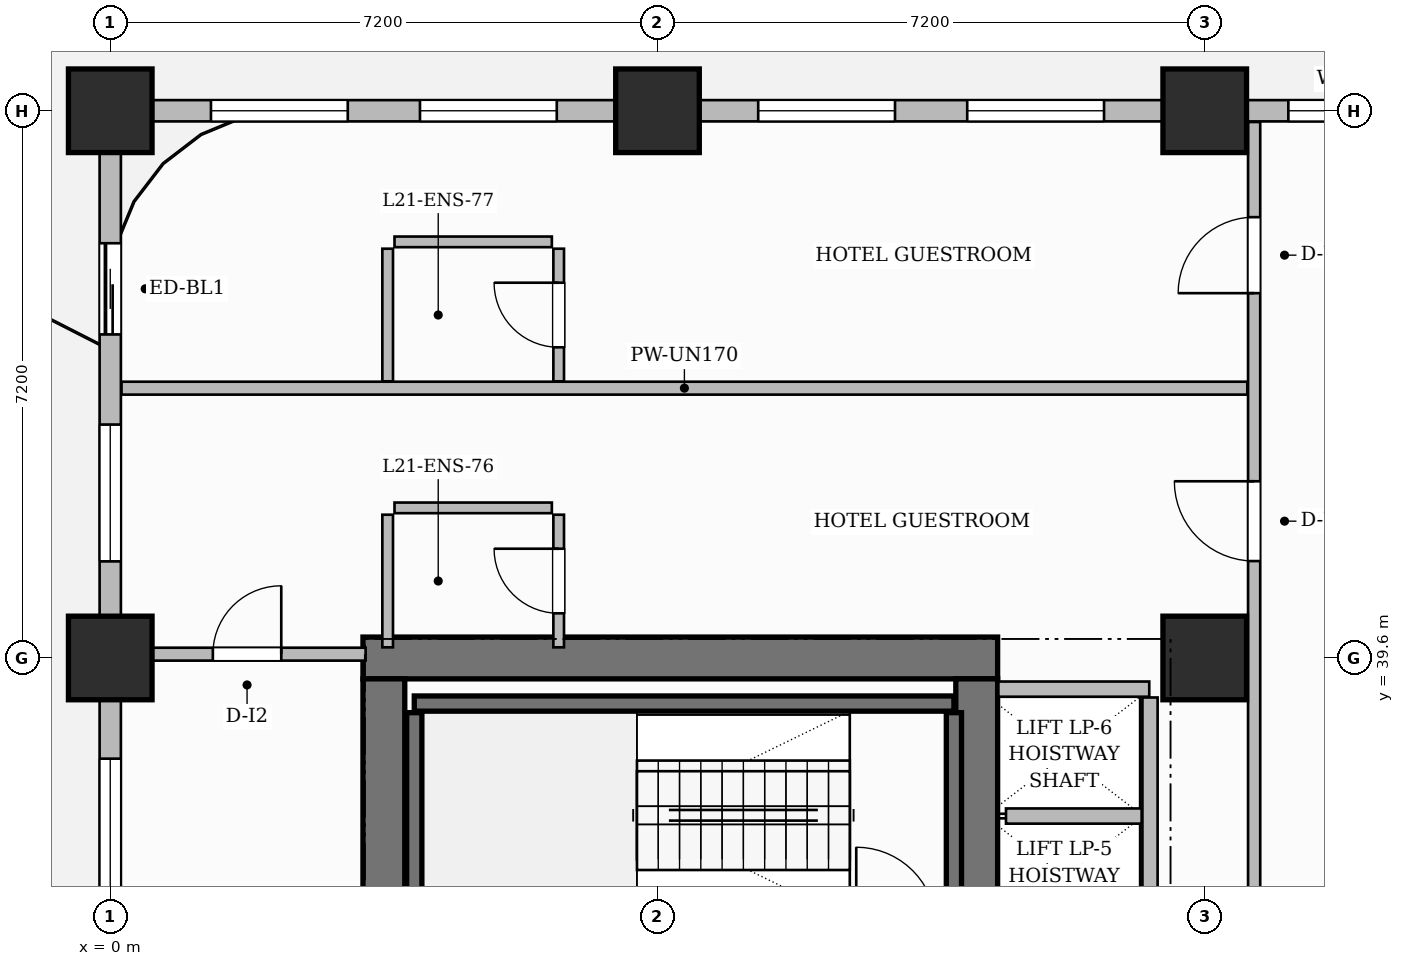
"""IFC4 building model, lengths in metres.
Left out: names, types, materials, properties, quantities, classifications, styles, units other than length and angle.
Written with IfcOpenShell. Run it as: python <this file> out.ifc"""

import sys

from ifc_helpers import new_model, si_unit, direction, frame, frame_2d, origin, origin_2d, place, context, subcontext, project, spatial, rectangle, extrude, source, transform, mapped, element, fill, save


model = new_model("IFC4")
c1 = context("Model", 3, precision=1e-05, world=origin(), true_north=direction((0.0, 1.0)))
c2 = subcontext(c1, "Body", "Model", "MODEL_VIEW")
j1 = project(units=[si_unit("LENGTHUNIT", "METRE"), si_unit("PLANEANGLEUNIT", "RADIAN")], contexts=[c1])
p1 = place(None, origin())
s1 = spatial("IfcSite", under=j1, at=p1, CompositionType="ELEMENT")
p2 = place(p1, origin())
s2 = spatial("IfcBuilding", under=s1, at=p2, CompositionType="ELEMENT")
p3 = place(p2, frame((0.0, 0.0, 87.9)))
s3 = spatial("IfcBuildingStorey", under=s2, at=p3, CompositionType="ELEMENT", Elevation=87.9)
p4 = place(p3, frame((3.325, 39.6, 0.0), z_axis=(0.0, 0.0, 1.0), x_axis=(1.0, 0.0, 0.0)))
e1 = element("IfcWall", 1, at=p4, inside=s3, PredefinedType="SHEAR", context=c2, shape_type="SweptSolid", body=[
    extrude(rectangle(XDim=8.35, YDim=0.55, at=frame_2d((4.175, 0.0))), origin(), (0.0, 0.0, 1.0), 3.7),
])
p5 = place(p3, frame((3.6, 25.475, 0.0), z_axis=(0.0, 0.0, 1.0), x_axis=(0.0, 1.0, 0.0)))
e2 = element("IfcWall", 2, at=p5, inside=s3, PredefinedType="SHEAR", context=c2, shape_type="SweptSolid", body=[
    extrude(rectangle(XDim=13.85, YDim=0.55, at=frame_2d((6.925, 0.0))), origin(), (0.0, 0.0, 1.0), 3.7),
])
p6 = place(p3, frame((11.4, 25.475, 0.0), z_axis=(0.0, 0.0, 1.0), x_axis=(0.0, 1.0, 0.0)))
e3 = element("IfcWall", 3, at=p6, inside=s3, PredefinedType="SHEAR", context=c2, shape_type="SweptSolid", body=[
    extrude(rectangle(XDim=13.85, YDim=0.55, at=frame_2d((6.925, 0.0))), origin(), (0.0, 0.0, 1.0), 3.7),
])
p7 = place(p6, frame((6.495, 0.0, 0.0)))
e4 = element("IfcOpeningElement", 4, at=p7, cuts=e3, PredefinedType="OPENING", context=c2, shape_type="SweptSolid", body=[
    extrude(rectangle(XDim=1.5, YDim=2.2, at=frame_2d((0.75, 1.1))), frame((0.0, 0.285, 0.0), z_axis=(0.0, -1.0, 0.0), x_axis=(1.0, 0.0, 0.0)), (0.0, 0.0, 1.0), 0.57),
])
m1 = source(origin(), c2, "Body", "SweptSolid", [
    extrude(rectangle(XDim=1.1, YDim=1.1, at=origin_2d()), origin(), (0.0, 0.0, 1.0), 3.7),
])
for number, where, z_axis, x_axis in (
    (5, (0.0, 39.6, 0.0), (0.0, 0.0, 1.0), (1.0, 0.0, 0.0)),
    (6, (0.0, 46.8, 0.0), (0.0, 0.0, 1.0), (1.0, 0.0, 0.0)),
    (7, (7.2, 46.8, 0.0), (0.0, 0.0, 1.0), (1.0, 0.0, 0.0)),
    (8, (14.4, 39.6, 0.0), (0.0, 0.0, 1.0), (1.0, 0.0, 0.0)),
    (9, (14.4, 46.8, 0.0), (0.0, 0.0, 1.0), (1.0, 0.0, 0.0)),
):
    element("IfcColumn", number, at=place(p3, frame(where, z_axis=z_axis, x_axis=x_axis)), inside=s3, PredefinedType="COLUMN", context=c2, shape_type="MappedRepresentation", body=[
        mapped(m1, transform((0.0, 0.0, 0.0), scale=1.0)),
    ])
p8 = place(p3, frame((4.0, 39.0, 0.0), z_axis=(0.0, 0.0, 1.0), x_axis=(1.0, 0.0, 0.0)))
e10 = element("IfcWall", 10, at=p8, inside=s3, PredefinedType="SHEAR", context=c2, shape_type="SweptSolid", body=[
    extrude(rectangle(XDim=7.1, YDim=0.2, at=frame_2d((3.55, 0.0))), origin(), (0.0, 0.0, 1.0), 3.7),
])
for number, where, z_axis, x_axis in (
    (11, (4.0, 36.18, 0.0), (0.0, 0.0, 1.0), (0.0, 1.0, 0.0)),
    (12, (11.1, 36.18, 0.0), (0.0, 0.0, 1.0), (0.0, 1.0, 0.0)),
):
    element("IfcWall", number, at=place(p3, frame(where, z_axis=z_axis, x_axis=x_axis)), inside=s3, PredefinedType="SHEAR", context=c2, shape_type="SweptSolid", body=[
        extrude(rectangle(XDim=2.7, YDim=0.2, at=frame_2d((1.35, 0.0))), origin(), (0.0, 0.0, 1.0), 3.7),
    ])
p9 = place(p3, frame((11.685, 39.19, 0.0), z_axis=(0.0, 0.0, 1.0), x_axis=(1.0, 0.0, 0.0)))
e13 = element("IfcWall", 13, at=p9, inside=s3, PredefinedType="PARTITIONING", context=c2, shape_type="SweptSolid", body=[
    extrude(rectangle(XDim=1.985, YDim=0.2, at=frame_2d((0.992, 0.0))), origin(), (0.0, 0.0, 1.0), 3.45),
])
p10 = place(p3, frame((13.68, 34.36, 0.0), z_axis=(0.0, 0.0, 1.0), x_axis=(0.0, 1.0, 0.0)))
e14 = element("IfcWall", 14, at=p10, inside=s3, PredefinedType="PARTITIONING", context=c2, shape_type="SweptSolid", body=[
    extrude(rectangle(XDim=4.72, YDim=0.2, at=frame_2d((2.36, 0.0))), origin(), (0.0, 0.0, 1.0), 3.45),
])
p11 = place(p3, frame((11.785, 37.52, 0.0), z_axis=(0.0, 0.0, 1.0), x_axis=(1.0, 0.0, 0.0)))
e15 = element("IfcWall", 15, at=p11, inside=s3, PredefinedType="PARTITIONING", context=c2, shape_type="SweptSolid", body=[
    extrude(rectangle(XDim=1.785, YDim=0.2, at=frame_2d((0.893, 0.0))), origin(), (0.0, 0.0, 1.0), 3.45),
])
p12 = place(p3, frame((0.24, 39.65, 0.0), z_axis=(0.0, 0.0, 1.0), x_axis=(1.0, 0.0, 0.0)))
e16 = element("IfcWall", 16, at=p12, inside=s3, PredefinedType="PARTITIONING", context=c2, shape_type="SweptSolid", body=[
    extrude(rectangle(XDim=3.12, YDim=0.17, at=frame_2d((1.56, 0.0))), origin(), (0.0, 0.0, 1.0), 3.45),
])
p13 = place(p12, frame((1.11, 0.0, 0.0)))
e17 = element("IfcOpeningElement", 17, at=p13, cuts=e16, PredefinedType="OPENING", context=c2, shape_type="SweptSolid", body=[
    extrude(rectangle(XDim=0.9, YDim=2.15, at=frame_2d((0.45, 1.075))), frame((0.0, 0.095, 0.0), z_axis=(0.0, -1.0, 0.0), x_axis=(1.0, 0.0, 0.0)), (0.0, 0.0, 1.0), 0.19),
])
p14 = place(p3, frame((15.05, 34.34, 0.0), z_axis=(0.0, 0.0, 1.0), x_axis=(0.0, 1.0, 0.0)))
e18 = element("IfcWall", 18, at=p14, inside=s3, PredefinedType="PARTITIONING", context=c2, shape_type="SweptSolid", body=[
    extrude(rectangle(XDim=12.312, YDim=0.16, at=frame_2d((6.156, 0.0))), origin(), (0.0, 0.0, 1.0), 3.45),
])
p15 = place(p14, frame((6.535, 0.0, 0.0)))
e19 = element("IfcOpeningElement", 19, at=p15, cuts=e18, PredefinedType="OPENING", context=c2, shape_type="SweptSolid", body=[
    extrude(rectangle(XDim=1.05, YDim=2.25, at=frame_2d((0.525, 1.125))), frame((0.0, 0.09, 0.0), z_axis=(0.0, -1.0, 0.0), x_axis=(1.0, 0.0, 0.0)), (0.0, 0.0, 1.0), 0.18),
])
p16 = place(p14, frame((10.06, 0.0, 0.0)))
e20 = element("IfcOpeningElement", 20, at=p16, cuts=e18, PredefinedType="OPENING", context=c2, shape_type="SweptSolid", body=[
    extrude(rectangle(XDim=1.0, YDim=2.2, at=frame_2d((0.5, 1.1))), frame((0.0, 0.09, 0.0), z_axis=(0.0, -1.0, 0.0), x_axis=(1.0, 0.0, 0.0)), (0.0, 0.0, 1.0), 0.18),
])
p17 = place(p3, frame((0.148, 43.15, 0.0), z_axis=(0.0, 0.0, 1.0), x_axis=(1.0, 0.0, 0.0)))
e21 = element("IfcWall", 21, at=p17, inside=s3, PredefinedType="PARTITIONING", context=c2, shape_type="SweptSolid", body=[
    extrude(rectangle(XDim=14.812, YDim=0.17, at=frame_2d((7.406, 0.0))), origin(), (0.0, 0.0, 1.0), 3.45),
])
p18 = place(p3, frame((3.65, 39.74, 0.0), z_axis=(0.0, 0.0, 1.0), x_axis=(0.0, 1.0, 0.0)))
e22 = element("IfcWall", 22, at=p18, inside=s3, PredefinedType="PARTITIONING", context=c2, shape_type="SweptSolid", body=[
    extrude(rectangle(XDim=1.745, YDim=0.14, at=frame_2d((0.873, 0.0))), origin(), (0.0, 0.0, 1.0), 3.45),
])
p19 = place(p3, frame((3.74, 41.575, 0.0), z_axis=(0.0, 0.0, 1.0), x_axis=(1.0, 0.0, 0.0)))
e23 = element("IfcWall", 23, at=p19, inside=s3, PredefinedType="PARTITIONING", context=c2, shape_type="SweptSolid", body=[
    extrude(rectangle(XDim=2.07, YDim=0.14, at=frame_2d((1.035, 0.0))), origin(), (0.0, 0.0, 1.0), 2.885),
])
p20 = place(p3, frame((5.9, 39.74, 0.0), z_axis=(0.0, 0.0, 1.0), x_axis=(0.0, 1.0, 0.0)))
e24 = element("IfcWall", 24, at=p20, inside=s3, PredefinedType="PARTITIONING", context=c2, shape_type="SweptSolid", body=[
    extrude(rectangle(XDim=1.745, YDim=0.14, at=frame_2d((0.873, 0.0))), origin(), (0.0, 0.0, 1.0), 3.45),
])
p21 = place(p20, frame((0.448, 0.0, 0.0)))
e25 = element("IfcOpeningElement", 25, at=p21, cuts=e24, PredefinedType="OPENING", context=c2, shape_type="SweptSolid", body=[
    extrude(rectangle(XDim=0.85, YDim=2.1, at=frame_2d((0.425, 1.05))), frame((0.0, 0.08, 0.0), z_axis=(0.0, -1.0, 0.0), x_axis=(1.0, 0.0, 0.0)), (0.0, 0.0, 1.0), 0.16),
])
p22 = place(p3, frame((3.65, 43.24, 0.0), z_axis=(0.0, 0.0, 1.0), x_axis=(0.0, 1.0, 0.0)))
e26 = element("IfcWall", 26, at=p22, inside=s3, PredefinedType="PARTITIONING", context=c2, shape_type="SweptSolid", body=[
    extrude(rectangle(XDim=1.745, YDim=0.14, at=frame_2d((0.873, 0.0))), origin(), (0.0, 0.0, 1.0), 3.45),
])
p23 = place(p3, frame((3.74, 45.075, 0.0), z_axis=(0.0, 0.0, 1.0), x_axis=(1.0, 0.0, 0.0)))
e27 = element("IfcWall", 27, at=p23, inside=s3, PredefinedType="PARTITIONING", context=c2, shape_type="SweptSolid", body=[
    extrude(rectangle(XDim=2.07, YDim=0.14, at=frame_2d((1.035, 0.0))), origin(), (0.0, 0.0, 1.0), 3.45),
])
p24 = place(p3, frame((5.9, 43.24, 0.0), z_axis=(0.0, 0.0, 1.0), x_axis=(0.0, 1.0, 0.0)))
e28 = element("IfcWall", 28, at=p24, inside=s3, PredefinedType="PARTITIONING", context=c2, shape_type="SweptSolid", body=[
    extrude(rectangle(XDim=1.745, YDim=0.14, at=frame_2d((0.873, 0.0))), origin(), (0.0, 0.0, 1.0), 3.45),
])
p25 = place(p24, frame((0.448, 0.0, 0.0)))
e29 = element("IfcOpeningElement", 29, at=p25, cuts=e28, PredefinedType="OPENING", context=c2, shape_type="SweptSolid", body=[
    extrude(rectangle(XDim=0.85, YDim=2.1, at=frame_2d((0.425, 1.05))), frame((0.0, 0.08, 0.0), z_axis=(0.0, -1.0, 0.0), x_axis=(1.0, 0.0, 0.0)), (0.0, 0.0, 1.0), 0.16),
])
p26 = place(p3, frame((0.0, 25.25, 0.0), z_axis=(0.0, 0.0, 1.0), x_axis=(0.0, 1.0, 0.0)))
e30 = element("IfcWall", 30, at=p26, inside=s3, PredefinedType="SOLIDWALL", context=c2, shape_type="SweptSolid", body=[
    extrude(rectangle(XDim=21.5, YDim=0.28, at=frame_2d((10.75, 0.0))), origin(), (0.0, 0.0, 1.0), 2.885),
])
p27 = place(p26, frame((18.607, 0.0, 0.0)))
e31 = element("IfcOpeningElement", 31, at=p27, cuts=e30, PredefinedType="OPENING", context=c2, shape_type="SweptSolid", body=[
    extrude(rectangle(XDim=1.2, YDim=2.2, at=frame_2d((0.6, 1.1))), frame((0.0, 0.15, 0.0), z_axis=(0.0, -1.0, 0.0), x_axis=(1.0, 0.0, 0.0)), (0.0, 0.0, 1.0), 0.3),
])
p28 = place(p26, frame((0.8, 0.0, 0.0)))
e32 = element("IfcOpeningElement", 32, at=p28, cuts=e30, PredefinedType="OPENING", context=c2, shape_type="SweptSolid", body=[
    extrude(rectangle(XDim=1.2, YDim=2.2, at=frame_2d((0.6, 1.1))), frame((0.0, 0.15, 0.0), z_axis=(0.0, -1.0, 0.0), x_axis=(1.0, 0.0, 0.0)), (0.0, 0.0, 1.0), 0.3),
])
p29 = place(p26, frame((3.425, 0.0, 0.8)))
e33 = element("IfcOpeningElement", 33, at=p29, cuts=e30, PredefinedType="OPENING", context=c2, shape_type="SweptSolid", body=[
    extrude(rectangle(XDim=1.8, YDim=1.85, at=frame_2d((0.9, 0.925))), frame((0.0, 0.15, 0.0), z_axis=(0.0, -1.0, 0.0), x_axis=(1.0, 0.0, 0.0)), (0.0, 0.0, 1.0), 0.3),
])
p30 = place(p26, frame((8.475, 0.0, 0.8)))
e34 = element("IfcOpeningElement", 34, at=p30, cuts=e30, PredefinedType="OPENING", context=c2, shape_type="SweptSolid", body=[
    extrude(rectangle(XDim=1.8, YDim=1.85, at=frame_2d((0.9, 0.925))), frame((0.0, 0.15, 0.0), z_axis=(0.0, -1.0, 0.0), x_axis=(1.0, 0.0, 0.0)), (0.0, 0.0, 1.0), 0.3),
])
p31 = place(p26, frame((11.225, 0.0, 0.8)))
e35 = element("IfcOpeningElement", 35, at=p31, cuts=e30, PredefinedType="OPENING", context=c2, shape_type="SweptSolid", body=[
    extrude(rectangle(XDim=1.8, YDim=1.85, at=frame_2d((0.9, 0.925))), frame((0.0, 0.15, 0.0), z_axis=(0.0, -1.0, 0.0), x_axis=(1.0, 0.0, 0.0)), (0.0, 0.0, 1.0), 0.3),
])
p32 = place(p26, frame((15.621, 0.0, 0.8)))
e36 = element("IfcOpeningElement", 36, at=p32, cuts=e30, PredefinedType="OPENING", context=c2, shape_type="SweptSolid", body=[
    extrude(rectangle(XDim=1.8, YDim=1.85, at=frame_2d((0.9, 0.925))), frame((0.0, 0.15, 0.0), z_axis=(0.0, -1.0, 0.0), x_axis=(1.0, 0.0, 0.0)), (0.0, 0.0, 1.0), 0.3),
])
p33 = place(p3, frame((0.0, 46.8, 0.0), z_axis=(0.0, 0.0, 1.0), x_axis=(1.0, 0.0, 0.0)))
e37 = element("IfcWall", 37, at=p33, inside=s3, PredefinedType="SOLIDWALL", context=c2, shape_type="SweptSolid", body=[
    extrude(rectangle(XDim=18.0, YDim=0.28, at=frame_2d((9.0, 0.0))), origin(), (0.0, 0.0, 1.0), 2.885),
])
p34 = place(p33, frame((1.325, 0.0, 0.8)))
e38 = element("IfcOpeningElement", 38, at=p34, cuts=e37, PredefinedType="OPENING", context=c2, shape_type="SweptSolid", body=[
    extrude(rectangle(XDim=1.8, YDim=1.85, at=frame_2d((0.9, 0.925))), frame((0.0, 0.15, 0.0), z_axis=(0.0, -1.0, 0.0), x_axis=(1.0, 0.0, 0.0)), (0.0, 0.0, 1.0), 0.3),
])
p35 = place(p33, frame((4.075, 0.0, 0.8)))
e39 = element("IfcOpeningElement", 39, at=p35, cuts=e37, PredefinedType="OPENING", context=c2, shape_type="SweptSolid", body=[
    extrude(rectangle(XDim=1.8, YDim=1.85, at=frame_2d((0.9, 0.925))), frame((0.0, 0.15, 0.0), z_axis=(0.0, -1.0, 0.0), x_axis=(1.0, 0.0, 0.0)), (0.0, 0.0, 1.0), 0.3),
])
p36 = place(p33, frame((8.525, 0.0, 0.8)))
e40 = element("IfcOpeningElement", 40, at=p36, cuts=e37, PredefinedType="OPENING", context=c2, shape_type="SweptSolid", body=[
    extrude(rectangle(XDim=1.8, YDim=1.85, at=frame_2d((0.9, 0.925))), frame((0.0, 0.15, 0.0), z_axis=(0.0, -1.0, 0.0), x_axis=(1.0, 0.0, 0.0)), (0.0, 0.0, 1.0), 0.3),
])
p37 = place(p33, frame((11.275, 0.0, 0.8)))
e41 = element("IfcOpeningElement", 41, at=p37, cuts=e37, PredefinedType="OPENING", context=c2, shape_type="SweptSolid", body=[
    extrude(rectangle(XDim=1.8, YDim=1.85, at=frame_2d((0.9, 0.925))), frame((0.0, 0.15, 0.0), z_axis=(0.0, -1.0, 0.0), x_axis=(1.0, 0.0, 0.0)), (0.0, 0.0, 1.0), 0.3),
])
p38 = place(p33, frame((15.5, 0.0, 0.8)))
e42 = element("IfcOpeningElement", 42, at=p38, cuts=e37, PredefinedType="OPENING", context=c2, shape_type="SweptSolid", body=[
    extrude(rectangle(XDim=1.4, YDim=1.85, at=frame_2d((0.7, 0.925))), frame((0.0, 0.15, 0.0), z_axis=(0.0, -1.0, 0.0), x_axis=(1.0, 0.0, 0.0)), (0.0, 0.0, 1.0), 0.3),
])
m2 = source(origin(), c2, "Body", "SweptSolid", [
    extrude(rectangle(XDim=0.9, YDim=2.15, at=frame_2d((0.45, 1.075))), frame((0.0, 0.025, 0.0), z_axis=(0.0, -1.0, 0.0), x_axis=(1.0, 0.0, 0.0)), (0.0, 0.0, 1.0), 0.05),
])
p39 = place(p13, origin())
e43 = element("IfcDoor", 43, at=p39, inside=s3, OperationType="SINGLE_SWING_RIGHT", PredefinedType="DOOR", context=c2, shape_type="MappedRepresentation", body=[
    mapped(m2, transform((0.0, 0.0, 0.0), scale=1.0)),
])
fill(e17, e43)
m3 = source(origin(), c2, "Body", "SweptSolid", [
    extrude(rectangle(XDim=0.85, YDim=2.1, at=frame_2d((0.425, 1.05))), frame((0.0, 0.025, 0.0), z_axis=(0.0, -1.0, 0.0), x_axis=(1.0, 0.0, 0.0)), (0.0, 0.0, 1.0), 0.05),
])
p40 = place(p21, origin())
e44 = element("IfcDoor", 44, at=p40, inside=s3, OperationType="SINGLE_SWING_RIGHT", PredefinedType="DOOR", context=c2, shape_type="MappedRepresentation", body=[
    mapped(m3, transform((0.0, 0.0, 0.0), scale=1.0)),
])
fill(e25, e44)
m4 = source(origin(), c2, "Body", "SweptSolid", [
    extrude(rectangle(XDim=1.05, YDim=2.25, at=frame_2d((0.525, 1.125))), frame((0.0, 0.025, 0.0), z_axis=(0.0, -1.0, 0.0), x_axis=(1.0, 0.0, 0.0)), (0.0, 0.0, 1.0), 0.05),
])
p41 = place(p15, origin())
e45 = element("IfcDoor", 45, at=p41, inside=s3, OperationType="SINGLE_SWING_RIGHT", PredefinedType="DOOR", context=c2, shape_type="MappedRepresentation", body=[
    mapped(m4, transform((0.0, 0.0, 0.0), scale=1.0)),
])
fill(e19, e45)
p42 = place(p25, origin())
e46 = element("IfcDoor", 46, at=p42, inside=s3, OperationType="SINGLE_SWING_RIGHT", PredefinedType="DOOR", context=c2, shape_type="MappedRepresentation", body=[
    mapped(m3, transform((0.0, 0.0, 0.0), scale=1.0)),
])
fill(e29, e46)
m5 = source(origin(), c2, "Body", "SweptSolid", [
    extrude(rectangle(XDim=1.0, YDim=2.2, at=frame_2d((0.5, 1.1))), frame((0.0, 0.025, 0.0), z_axis=(0.0, -1.0, 0.0), x_axis=(1.0, 0.0, 0.0)), (0.0, 0.0, 1.0), 0.05),
])
p43 = place(p16, origin())
e47 = element("IfcDoor", 47, at=p43, inside=s3, OperationType="SINGLE_SWING_LEFT", PredefinedType="DOOR", context=c2, shape_type="MappedRepresentation", body=[
    mapped(m5, transform((0.0, 0.0, 0.0), scale=1.0)),
])
fill(e20, e47)
m6 = source(origin(), c2, "Body", "SweptSolid", [
    extrude(rectangle(XDim=1.2, YDim=2.2, at=frame_2d((0.6, 1.1))), frame((0.0, 0.025, 0.0), z_axis=(0.0, -1.0, 0.0), x_axis=(1.0, 0.0, 0.0)), (0.0, 0.0, 1.0), 0.05),
])
p44 = place(p27, origin())
e48 = element("IfcDoor", 48, at=p44, inside=s3, OperationType="SLIDING_TO_LEFT", PredefinedType="DOOR", context=c2, shape_type="MappedRepresentation", body=[
    mapped(m6, transform((0.0, 0.0, 0.0), scale=1.0)),
])
fill(e31, e48)
m7 = source(origin(), c2, "Body", "SweptSolid", [
    extrude(rectangle(XDim=1.8, YDim=1.85, at=frame_2d((0.9, 0.925))), frame((0.0, 0.03, 0.0), z_axis=(0.0, -1.0, 0.0), x_axis=(1.0, 0.0, 0.0)), (0.0, 0.0, 1.0), 0.06),
])
p45 = place(p31, origin())
e49 = element("IfcWindow", 49, at=p45, inside=s3, PartitioningType="DOUBLE_PANEL_VERTICAL", PredefinedType="WINDOW", context=c2, shape_type="MappedRepresentation", body=[
    mapped(m7, transform((0.0, 0.0, 0.0), scale=1.0)),
])
fill(e35, e49)
p46 = place(p32, origin())
e50 = element("IfcWindow", 50, at=p46, inside=s3, PartitioningType="DOUBLE_PANEL_VERTICAL", PredefinedType="WINDOW", context=c2, shape_type="MappedRepresentation", body=[
    mapped(m7, transform((0.0, 0.0, 0.0), scale=1.0)),
])
fill(e36, e50)
p47 = place(p34, origin())
e51 = element("IfcWindow", 51, at=p47, inside=s3, PartitioningType="DOUBLE_PANEL_VERTICAL", PredefinedType="WINDOW", context=c2, shape_type="MappedRepresentation", body=[
    mapped(m7, transform((0.0, 0.0, 0.0), scale=1.0)),
])
fill(e38, e51)
p48 = place(p35, origin())
e52 = element("IfcWindow", 52, at=p48, inside=s3, PartitioningType="DOUBLE_PANEL_VERTICAL", PredefinedType="WINDOW", context=c2, shape_type="MappedRepresentation", body=[
    mapped(m7, transform((0.0, 0.0, 0.0), scale=1.0)),
])
fill(e39, e52)
p49 = place(p36, origin())
e53 = element("IfcWindow", 53, at=p49, inside=s3, PartitioningType="DOUBLE_PANEL_VERTICAL", PredefinedType="WINDOW", context=c2, shape_type="MappedRepresentation", body=[
    mapped(m7, transform((0.0, 0.0, 0.0), scale=1.0)),
])
fill(e40, e53)
p50 = place(p37, origin())
e54 = element("IfcWindow", 54, at=p50, inside=s3, PartitioningType="DOUBLE_PANEL_VERTICAL", PredefinedType="WINDOW", context=c2, shape_type="MappedRepresentation", body=[
    mapped(m7, transform((0.0, 0.0, 0.0), scale=1.0)),
])
fill(e41, e54)
m8 = source(origin(), c2, "Body", "SweptSolid", [
    extrude(rectangle(XDim=1.4, YDim=1.85, at=frame_2d((0.7, 0.925))), frame((0.0, 0.03, 0.0), z_axis=(0.0, -1.0, 0.0), x_axis=(1.0, 0.0, 0.0)), (0.0, 0.0, 1.0), 0.06),
])
p51 = place(p38, origin())
e55 = element("IfcWindow", 55, at=p51, inside=s3, PartitioningType="SINGLE_PANEL", PredefinedType="WINDOW", context=c2, shape_type="MappedRepresentation", body=[
    mapped(m8, transform((0.0, 0.0, 0.0), scale=1.0)),
])
fill(e42, e55)
save(model, sys.argv[1])
